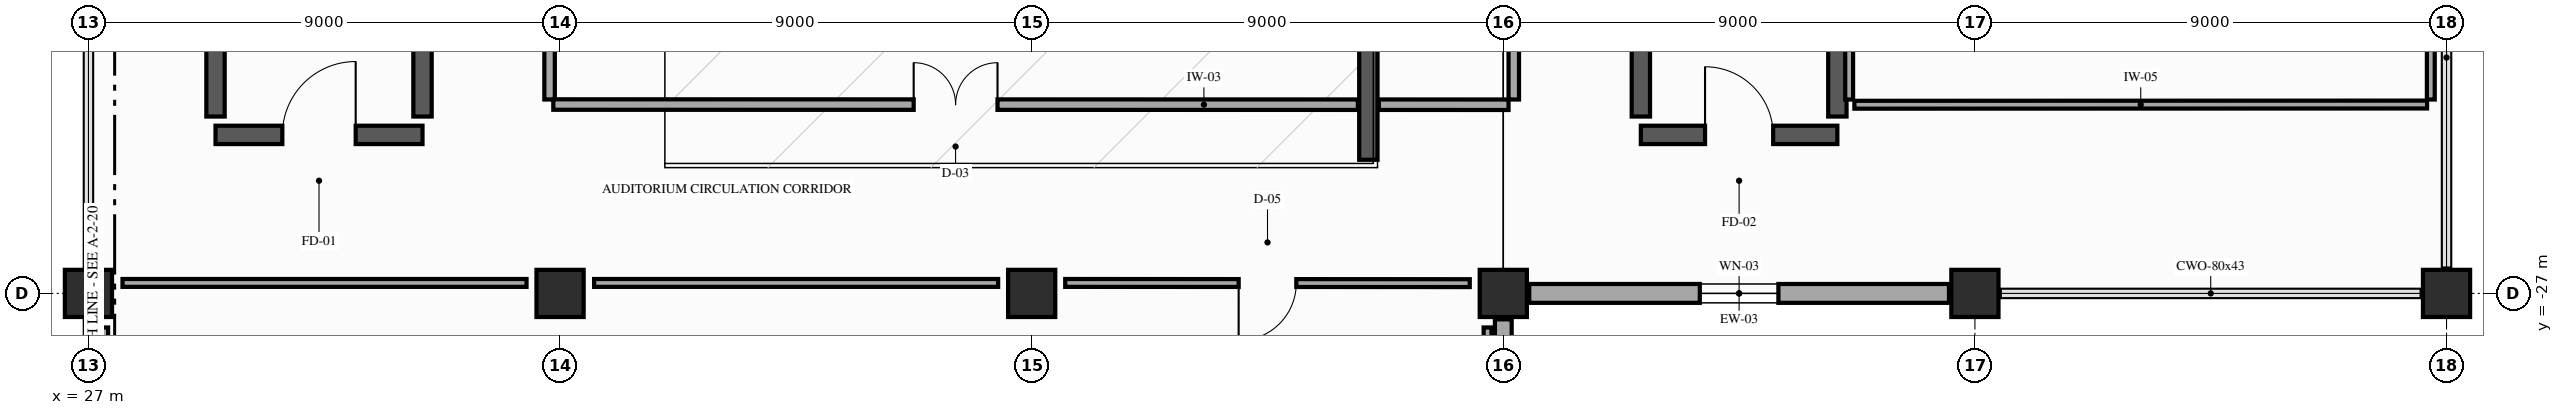
"""IFC4 building model, lengths in metres.
Left out: names, types, materials, properties, quantities, classifications, styles, units other than length and angle.
Written with IfcOpenShell. Run it as: python <this file> out.ifc"""

import sys

from ifc_helpers import new_model, si_unit, direction, frame, frame_2d, origin, origin_2d, place, context, subcontext, project, spatial, rectangle, extrude, element, fill, save


model = new_model("IFC4")
c1 = context("Model", 3, precision=1e-05, world=origin(), true_north=direction((0.0, 1.0)))
c2 = subcontext(c1, "Body", "Model", "MODEL_VIEW")
j1 = project(units=[si_unit("LENGTHUNIT", "METRE"), si_unit("PLANEANGLEUNIT", "RADIAN")], contexts=[c1])
p1 = place(None, origin())
s1 = spatial("IfcSite", under=j1, at=p1, CompositionType="ELEMENT")
p2 = place(p1, origin())
s2 = spatial("IfcBuilding", under=s1, at=p2, CompositionType="ELEMENT")
p3 = place(p2, frame((0.0, 0.0, 5.4)))
s3 = spatial("IfcBuildingStorey", under=s2, at=p3, CompositionType="ELEMENT", Elevation=5.4)
p4 = place(p3, frame((51.425, -24.45, 0.0), z_axis=(0.0, 0.0, 1.0), x_axis=(0.0, 1.0, 0.0)))
e1 = element("IfcWall", 1, at=p4, inside=s3, PredefinedType="SHEAR", context=c2, shape_type="SweptSolid", body=[
    extrude(rectangle(XDim=6.0, YDim=0.35, at=frame_2d((3.0, 0.0))), origin(), (0.0, 0.0, 1.0), 2.403),
])
for number, where, z_axis, x_axis in (
    (2, (27.0, -27.0, 0.0), (0.0, 0.0, 1.0), (1.0, 0.0, 0.0)),
    (3, (36.0, -27.0, 0.0), (0.0, 0.0, 1.0), (1.0, 0.0, 0.0)),
    (4, (45.0, -27.0, 0.0), (0.0, 0.0, 1.0), (1.0, 0.0, 0.0)),
    (5, (54.0, -27.0, 0.0), (0.0, 0.0, 1.0), (1.0, 0.0, 0.0)),
    (6, (63.0, -27.0, 0.0), (0.0, 0.0, 1.0), (1.0, 0.0, 0.0)),
    (7, (72.0, -27.0, 0.0), (0.0, 0.0, 1.0), (1.0, 0.0, 0.0)),
):
    element("IfcColumn", number, at=place(p3, frame(where, z_axis=z_axis, x_axis=x_axis)), inside=s3, PredefinedType="COLUMN", context=c2, shape_type="SweptSolid", body=[
        extrude(rectangle(XDim=0.9, YDim=0.9, at=origin_2d()), origin(), (0.0, 0.0, 1.0), 5.4),
    ])
p5 = place(p3, frame((62.505, -27.0, 0.0), z_axis=(0.0, 0.0, 1.0), x_axis=(-1.0, 0.0, 0.0)))
e8 = element("IfcWall", 8, at=p5, inside=s3, PredefinedType="SOLIDWALL", context=c2, shape_type="SweptSolid", body=[
    extrude(rectangle(XDim=8.01, YDim=0.36, at=frame_2d((4.005, 0.0))), origin(), (0.0, 0.0, 1.0), 4.375),
])
p6 = place(p5, frame((3.255, 0.0, 0.9)))
e9 = element("IfcOpeningElement", 9, at=p6, cuts=e8, PredefinedType="OPENING", context=c2, shape_type="SweptSolid", body=[
    extrude(rectangle(XDim=1.5, YDim=2.8, at=frame_2d((0.75, 1.4))), frame((0.0, 0.19, 0.0), z_axis=(0.0, -1.0, 0.0), x_axis=(1.0, 0.0, 0.0)), (0.0, 0.0, 1.0), 0.38),
])
p7 = place(p3, frame((54.0, -27.495, 0.0), z_axis=(0.0, 0.0, 1.0), x_axis=(0.0, -1.0, 0.0)))
e10 = element("IfcWall", 10, at=p7, inside=s3, PredefinedType="SOLIDWALL", context=c2, shape_type="SweptSolid", body=[
    extrude(rectangle(XDim=8.01, YDim=0.32, at=frame_2d((4.005, 0.0))), origin(), (0.0, 0.0, 1.0), 4.375),
])
p8 = place(p7, frame((3.105, 0.0, 0.9)))
e11 = element("IfcOpeningElement", 11, at=p8, cuts=e10, PredefinedType="OPENING", context=c2, shape_type="SweptSolid", body=[
    extrude(rectangle(XDim=1.8, YDim=2.6, at=frame_2d((0.9, 1.3))), frame((0.0, 0.17, 0.0), z_axis=(0.0, -1.0, 0.0), x_axis=(1.0, 0.0, 0.0)), (0.0, 0.0, 1.0), 0.34),
])
p9 = place(p3, frame((29.425, -23.975, 0.0), z_axis=(0.0, 0.0, 1.0), x_axis=(1.0, 0.0, 0.0)))
e12 = element("IfcWall", 12, at=p9, inside=s3, PredefinedType="SHEAR", context=c2, shape_type="SweptSolid", body=[
    extrude(rectangle(XDim=3.95, YDim=0.35, at=frame_2d((1.975, 0.0))), origin(), (0.0, 0.0, 1.0), 5.15),
])
p10 = place(p9, frame((1.275, 0.0, 0.0)))
e13 = element("IfcOpeningElement", 13, at=p10, cuts=e12, PredefinedType="OPENING", context=c2, shape_type="SweptSolid", body=[
    extrude(rectangle(XDim=1.4, YDim=2.2, at=frame_2d((0.7, 1.1))), frame((0.0, 0.185, 0.0), z_axis=(0.0, -1.0, 0.0), x_axis=(1.0, 0.0, 0.0)), (0.0, 0.0, 1.0), 0.37),
])
for number, where, z_axis, x_axis in (
    (14, (29.425, -23.625, 0.0), (0.0, 0.0, 1.0), (0.0, 1.0, 0.0)),
    (15, (33.375, -23.625, 0.0), (0.0, 0.0, 1.0), (0.0, 1.0, 0.0)),
):
    element("IfcWall", number, at=place(p3, frame(where, z_axis=z_axis, x_axis=x_axis)), inside=s3, PredefinedType="SHEAR", context=c2, shape_type="SweptSolid", body=[
        extrude(rectangle(XDim=9.1, YDim=0.35, at=frame_2d((4.55, 0.0))), origin(), (0.0, 0.0, 1.0), 5.15),
    ])
p11 = place(p3, frame((56.625, -23.975, 0.0), z_axis=(0.0, 0.0, 1.0), x_axis=(1.0, 0.0, 0.0)))
e16 = element("IfcWall", 16, at=p11, inside=s3, PredefinedType="SHEAR", context=c2, shape_type="SweptSolid", body=[
    extrude(rectangle(XDim=3.75, YDim=0.35, at=frame_2d((1.875, 0.0))), origin(), (0.0, 0.0, 1.0), 5.15),
])
p12 = place(p11, frame((1.225, 0.0, 0.0)))
e17 = element("IfcOpeningElement", 17, at=p12, cuts=e16, PredefinedType="OPENING", context=c2, shape_type="SweptSolid", body=[
    extrude(rectangle(XDim=1.3, YDim=2.2, at=frame_2d((0.65, 1.1))), frame((0.0, 0.185, 0.0), z_axis=(0.0, -1.0, 0.0), x_axis=(1.0, 0.0, 0.0)), (0.0, 0.0, 1.0), 0.37),
])
for number, where, z_axis, x_axis in (
    (18, (56.625, -23.625, 0.0), (0.0, 0.0, 1.0), (0.0, 1.0, 0.0)),
    (19, (60.375, -23.625, 0.0), (0.0, 0.0, 1.0), (0.0, 1.0, 0.0)),
):
    element("IfcWall", number, at=place(p3, frame(where, z_axis=z_axis, x_axis=x_axis)), inside=s3, PredefinedType="SHEAR", context=c2, shape_type="SweptSolid", body=[
        extrude(rectangle(XDim=9.1, YDim=0.35, at=frame_2d((4.55, 0.0))), origin(), (0.0, 0.0, 1.0), 5.15),
    ])
p13 = place(p3, frame((35.8, -18.64, 0.0), z_axis=(0.0, 0.0, 1.0), x_axis=(0.0, -1.0, 0.0)))
e20 = element("IfcWall", 20, at=p13, inside=s3, PredefinedType="PARTITIONING", context=c2, shape_type="SweptSolid", body=[
    extrude(rectangle(XDim=4.66, YDim=0.2, at=frame_2d((2.33, 0.0))), origin(), (0.0, 0.0, 1.0), 4.425),
])
p14 = place(p3, frame((35.871, -23.396, 0.0), z_axis=(0.0, 0.0, 1.0), x_axis=(0.999999981796, -0.000190809346, 0.0)))
e21 = element("IfcWall", 21, at=p14, inside=s3, PredefinedType="PARTITIONING", context=c2, shape_type="SweptSolid", body=[
    extrude(rectangle(XDim=15.354, YDim=0.2, at=frame_2d((7.677, 0.0))), origin(), (0.0, 0.0, 1.0), 4.425),
])
p15 = place(p14, frame((6.877, 0.0, 0.0)))
e22 = element("IfcOpeningElement", 22, at=p15, cuts=e21, PredefinedType="OPENING", context=c2, shape_type="SweptSolid", body=[
    extrude(rectangle(XDim=1.6, YDim=2.3, at=frame_2d((0.8, 1.15))), frame((0.0, 0.11, 0.0), z_axis=(0.0, -1.0, 0.0), x_axis=(1.0, 0.0, 0.0)), (0.0, 0.0, 1.0), 0.22),
])
p16 = place(p3, frame((51.625, -23.399, 0.0), z_axis=(0.0, 0.0, 1.0), x_axis=(0.999999922163, -0.000394555108, 0.0)))
e23 = element("IfcWall", 23, at=p16, inside=s3, PredefinedType="PARTITIONING", context=c2, shape_type="SweptSolid", body=[
    extrude(rectangle(XDim=2.475, YDim=0.2, at=frame_2d((1.238, 0.0))), origin(), (0.0, 0.0, 1.0), 4.425),
])
p17 = place(p3, frame((54.2, -23.3, 0.0), z_axis=(0.0, 0.0, 1.0), x_axis=(0.0, 1.0, 0.0)))
e24 = element("IfcWall", 24, at=p17, inside=s3, PredefinedType="PARTITIONING", context=c2, shape_type="SweptSolid", body=[
    extrude(rectangle(XDim=4.66, YDim=0.2, at=frame_2d((2.33, 0.0))), origin(), (0.0, 0.0, 1.0), 4.425),
])
p18 = place(p3, frame((60.6, -9.39, 0.0), z_axis=(0.0, 0.0, 1.0), x_axis=(0.0, -1.0, 0.0)))
e25 = element("IfcWall", 25, at=p18, inside=s3, PredefinedType="PARTITIONING", context=c2, shape_type="SweptSolid", body=[
    extrude(rectangle(XDim=13.91, YDim=0.15, at=frame_2d((6.955, 0.0))), origin(), (0.0, 0.0, 1.0), 4.375),
])
p19 = place(p18, frame((3.067, 0.0, 0.0)))
e26 = element("IfcOpeningElement", 26, at=p19, cuts=e25, PredefinedType="OPENING", context=c2, shape_type="SweptSolid", body=[
    extrude(rectangle(XDim=1.1, YDim=2.15, at=frame_2d((0.55, 1.075))), frame((0.0, 0.085, 0.0), z_axis=(0.0, -1.0, 0.0), x_axis=(1.0, 0.0, 0.0)), (0.0, 0.0, 1.0), 0.17),
])
p20 = place(p3, frame((60.7, -23.4, 0.0), z_axis=(0.0, 0.0, 1.0), x_axis=(0.999999936125, 0.00035742207, 0.0)))
e27 = element("IfcWall", 27, at=p20, inside=s3, PredefinedType="PARTITIONING", context=c2, shape_type="SweptSolid", body=[
    extrude(rectangle(XDim=10.929, YDim=0.15, at=frame_2d((5.464, 0.0))), origin(), (0.0, 0.0, 1.0), 4.425),
])
p21 = place(p3, frame((71.7, -23.3, 0.0), z_axis=(0.0, 0.0, 1.0), x_axis=(0.0, 1.0, 0.0)))
e28 = element("IfcWall", 28, at=p21, inside=s3, PredefinedType="PARTITIONING", context=c2, shape_type="SweptSolid", body=[
    extrude(rectangle(XDim=4.65, YDim=0.15, at=frame_2d((2.325, 0.0))), origin(), (0.0, 0.0, 1.0), 4.425),
])
p22 = place(p3, frame((27.3, -27.65, 0.0), z_axis=(0.0, 0.0, 1.0), x_axis=(0.0, -1.0, 0.0)))
e29 = element("IfcWall", 29, at=p22, inside=s3, PredefinedType="PARTITIONING", context=c2, shape_type="SweptSolid", body=[
    extrude(rectangle(XDim=7.7, YDim=0.15, at=frame_2d((3.85, 0.0))), origin(), (0.0, 0.0, 1.0), 4.425),
])
p23 = place(p3, frame((53.696, -35.36, 0.0), z_axis=(0.0, 0.0, 1.0), x_axis=(0.00050663367, 0.999999871661, 0.0)))
e30 = element("IfcWall", 30, at=p23, inside=s3, PredefinedType="PARTITIONING", context=c2, shape_type="SweptSolid", body=[
    extrude(rectangle(XDim=7.71, YDim=0.15, at=frame_2d((3.855, 0.0))), origin(), (0.0, 0.0, 1.0), 4.425),
])
p24 = place(p3, frame((53.36, -26.804, 0.0), z_axis=(0.0, 0.0, 1.0), x_axis=(-0.999999871994, 0.000505976787, 0.0)))
e31 = element("IfcWall", 31, at=p24, inside=s3, PredefinedType="PARTITIONING", context=c2, shape_type="SweptSolid", body=[
    extrude(rectangle(XDim=7.72, YDim=0.15, at=frame_2d((3.86, 0.0))), origin(), (0.0, 0.0, 1.0), 4.375),
])
p25 = place(p24, frame((3.31, 0.0, 0.0)))
e32 = element("IfcOpeningElement", 32, at=p25, cuts=e31, PredefinedType="OPENING", context=c2, shape_type="SweptSolid", body=[
    extrude(rectangle(XDim=1.1, YDim=2.15, at=frame_2d((0.55, 1.075))), frame((0.0, 0.085, 0.0), z_axis=(0.0, -1.0, 0.0), x_axis=(1.0, 0.0, 0.0)), (0.0, 0.0, 1.0), 0.17),
])
for number, where, z_axis, x_axis in (
    (33, (44.36, -26.8, 0.0), (0.0, 0.0, 1.0), (-1.0, 0.0, 0.0)),
    (34, (35.36, -26.8, 0.0), (0.0, 0.0, 1.0), (-1.0, 0.0, 0.0)),
):
    element("IfcWall", number, at=place(p3, frame(where, z_axis=z_axis, x_axis=x_axis)), inside=s3, PredefinedType="PARTITIONING", context=c2, shape_type="SweptSolid", body=[
        extrude(rectangle(XDim=7.71, YDim=0.15, at=frame_2d((3.855, 0.0))), origin(), (0.0, 0.0, 1.0), 4.375),
    ])
p26 = place(p6, origin())
e35 = element("IfcWindow", 35, at=p26, inside=s3, PartitioningType="SINGLE_PANEL", PredefinedType="WINDOW", context=c2, shape_type="SweptSolid", body=[
    extrude(rectangle(XDim=1.5, YDim=2.8, at=frame_2d((0.75, 1.4))), frame((0.0, 0.03, 0.0), z_axis=(0.0, -1.0, 0.0), x_axis=(1.0, 0.0, 0.0)), (0.0, 0.0, 1.0), 0.06),
])
fill(e9, e35)
p27 = place(p10, origin())
e36 = element("IfcDoor", 36, at=p27, inside=s3, OperationType="SINGLE_SWING_RIGHT", PredefinedType="DOOR", context=c2, shape_type="SweptSolid", body=[
    extrude(rectangle(XDim=1.4, YDim=2.2, at=frame_2d((0.7, 1.1))), frame((0.0, 0.025, 0.0), z_axis=(0.0, -1.0, 0.0), x_axis=(1.0, 0.0, 0.0)), (0.0, 0.0, 1.0), 0.05),
])
fill(e13, e36)
p28 = place(p12, origin())
e37 = element("IfcDoor", 37, at=p28, inside=s3, OperationType="SINGLE_SWING_LEFT", PredefinedType="DOOR", context=c2, shape_type="SweptSolid", body=[
    extrude(rectangle(XDim=1.3, YDim=2.2, at=frame_2d((0.65, 1.1))), frame((0.0, 0.025, 0.0), z_axis=(0.0, -1.0, 0.0), x_axis=(1.0, 0.0, 0.0)), (0.0, 0.0, 1.0), 0.05),
])
fill(e17, e37)
p29 = place(p15, origin())
e38 = element("IfcDoor", 38, at=p29, inside=s3, OperationType="DOUBLE_DOOR_SINGLE_SWING", PredefinedType="DOOR", context=c2, shape_type="SweptSolid", body=[
    extrude(rectangle(XDim=1.6, YDim=2.3, at=frame_2d((0.8, 1.15))), frame((0.0, 0.025, 0.0), z_axis=(0.0, -1.0, 0.0), x_axis=(1.0, 0.0, 0.0)), (0.0, 0.0, 1.0), 0.05),
])
fill(e22, e38)
p30 = place(p25, origin())
e39 = element("IfcDoor", 39, at=p30, inside=s3, OperationType="SINGLE_SWING_RIGHT", PredefinedType="DOOR", context=c2, shape_type="SweptSolid", body=[
    extrude(rectangle(XDim=1.1, YDim=2.15, at=frame_2d((0.55, 1.075))), frame((0.0, 0.025, 0.0), z_axis=(0.0, -1.0, 0.0), x_axis=(1.0, 0.0, 0.0)), (0.0, 0.0, 1.0), 0.05),
])
fill(e32, e39)
save(model, sys.argv[1])
